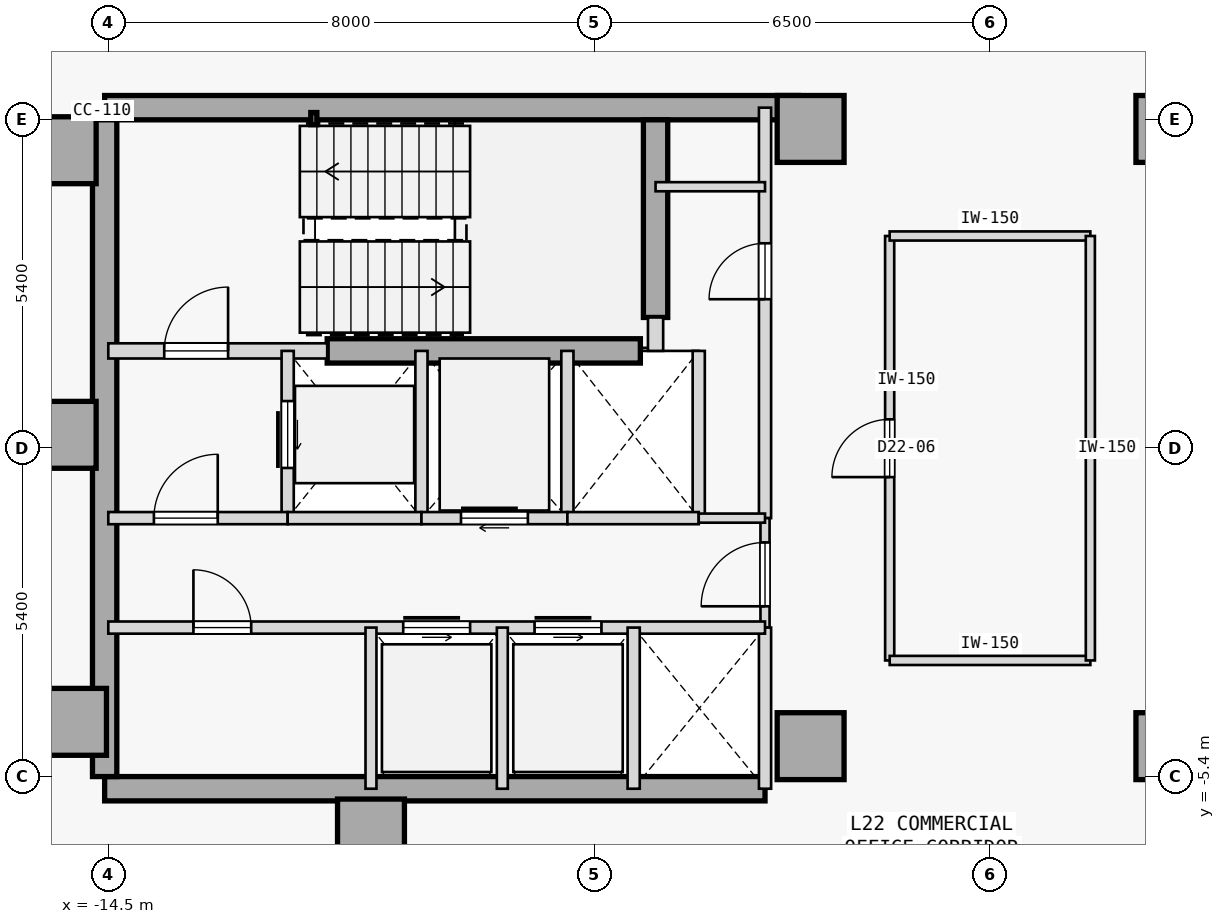
"""IFC4 building model, lengths in metres.
Left out: names, types, materials, properties, quantities, classifications, styles, units other than length and angle.
Written with IfcOpenShell. Run it as: python <this file> out.ifc"""

import sys

from ifc_helpers import new_model, si_unit, direction, frame, frame_2d, origin, origin_2d, place, context, subcontext, project, spatial, rectangle, hollow_rectangle, extrude, element, fill, save


model = new_model("IFC4")
c1 = context("Model", 3, precision=1e-05, world=origin(), true_north=direction((0.0, 1.0)))
c2 = subcontext(c1, "Body", "Model", "MODEL_VIEW")
j1 = project(units=[si_unit("LENGTHUNIT", "METRE"), si_unit("PLANEANGLEUNIT", "RADIAN")], contexts=[c1])
p1 = place(None, origin())
s1 = spatial("IfcSite", under=j1, at=p1, CompositionType="ELEMENT")
p2 = place(p1, origin())
s2 = spatial("IfcBuilding", under=s1, at=p2, CompositionType="ELEMENT")
p3 = place(p2, frame((0.0, 0.0, 91.1)))
s3 = spatial("IfcBuildingStorey", under=s2, at=p3, CompositionType="ELEMENT", Elevation=91.1)
for number, where, z_axis, x_axis in (
    (1, (-15.25, 4.9, 0.0), (0.0, 0.0, 1.0), (1.0, 0.0, 0.0)),
    (2, (-15.25, 0.22, 0.0), (0.0, 0.0, 1.0), (1.0, 0.0, 0.0)),
    (3, (-15.08, -4.5, 0.0), (0.0, 0.0, 1.0), (1.0, 0.0, 0.0)),
    (4, (-10.18, -6.32, 0.0), (0.0, 0.0, 1.0), (1.0, 0.0, 0.0)),
    (5, (-2.95, -4.9, 0.0), (0.0, 0.0, 1.0), (1.0, 0.0, 0.0)),
    (6, (-2.95, 5.25, 0.0), (0.0, 0.0, 1.0), (1.0, 0.0, 0.0)),
    (7, (2.95, -4.9, 0.0), (0.0, 0.0, 1.0), (1.0, 0.0, 0.0)),
    (8, (2.95, 5.25, 0.0), (0.0, 0.0, 1.0), (1.0, 0.0, 0.0)),
):
    element("IfcColumn", number, at=place(p3, frame(where, z_axis=z_axis, x_axis=x_axis)), inside=s3, PredefinedType="COLUMN", context=c2, shape_type="SweptSolid", body=[
        extrude(rectangle(XDim=1.1, YDim=1.1, at=origin_2d()), origin(), (0.0, 0.0, 1.0), 3.7),
    ])
p4 = place(p3, frame((-14.56, 5.6, 0.0), z_axis=(0.0, 0.0, 1.0), x_axis=(1.0, 0.0, 0.0)))
e9 = element("IfcWall", 9, at=p4, inside=s3, PredefinedType="SHEAR", context=c2, shape_type="SweptSolid", body=[
    extrude(rectangle(XDim=11.41, YDim=0.4, at=frame_2d((5.705, 0.0))), origin(), (0.0, 0.0, 1.0), 3.475),
])
p5 = place(p3, frame((-14.56, -5.6, 0.0), z_axis=(0.0, 0.0, 1.0), x_axis=(1.0, 0.0, 0.0)))
e10 = element("IfcWall", 10, at=p5, inside=s3, PredefinedType="SHEAR", context=c2, shape_type="SweptSolid", body=[
    extrude(rectangle(XDim=10.86, YDim=0.4, at=frame_2d((5.43, 0.0))), origin(), (0.0, 0.0, 1.0), 3.475),
])
p6 = place(p3, frame((-14.56, -5.4, 0.0), z_axis=(0.0, 0.0, 1.0), x_axis=(0.0, 1.0, 0.0)))
e11 = element("IfcWall", 11, at=p6, inside=s3, PredefinedType="SHEAR", context=c2, shape_type="SweptSolid", body=[
    extrude(rectangle(XDim=10.8, YDim=0.4, at=frame_2d((5.4, 0.0))), origin(), (0.0, 0.0, 1.0), 3.475),
])
p7 = place(p3, frame((-5.5, 2.15, 0.0), z_axis=(0.0, 0.0, 1.0), x_axis=(0.0, 1.0, 0.0)))
e12 = element("IfcWall", 12, at=p7, inside=s3, PredefinedType="SHEAR", context=c2, shape_type="SweptSolid", body=[
    extrude(rectangle(XDim=3.25, YDim=0.4, at=frame_2d((1.625, 0.0))), origin(), (0.0, 0.0, 1.0), 3.475),
])
p8 = place(p3, frame((-10.9, 1.6, 0.0), z_axis=(0.0, 0.0, 1.0), x_axis=(1.0, 0.0, 0.0)))
e13 = element("IfcWall", 13, at=p8, inside=s3, PredefinedType="SHEAR", context=c2, shape_type="SweptSolid", body=[
    extrude(rectangle(XDim=5.15, YDim=0.4, at=frame_2d((2.575, 0.0))), origin(), (0.0, 0.0, 1.0), 3.475),
])
p9 = place(p3, frame((-11.12, 5.42, 0.0), z_axis=(0.0, 0.0, 1.0), x_axis=(1.0, 0.0, 0.0)))
e14 = element("IfcColumn", 14, at=p9, inside=s3, PredefinedType="COLUMN", context=c2, shape_type="SweptSolid", body=[
    extrude(hollow_rectangle(XDim=0.1, YDim=0.2, WallThickness=0.008, at=origin_2d()), origin(), (0.0, 0.0, 1.0), 3.7),
])
p10 = place(p3, frame((-14.5, 1.6, 0.0), z_axis=(0.0, 0.0, 1.0), x_axis=(1.0, 0.0, 0.0)))
e15 = element("IfcWall", 15, at=p10, inside=s3, PredefinedType="STANDARD", context=c2, shape_type="SweptSolid", body=[
    extrude(rectangle(XDim=3.6, YDim=0.25, at=frame_2d((1.8, 0.0))), origin(), (0.0, 0.0, 1.0), 3.475),
])
p11 = place(p10, frame((0.92, 0.0, 0.0)))
e16 = element("IfcOpeningElement", 16, at=p11, cuts=e15, PredefinedType="OPENING", context=c2, shape_type="SweptSolid", body=[
    extrude(rectangle(XDim=1.05, YDim=2.15, at=frame_2d((0.525, 1.075))), frame((0.0, 0.135, 0.0), z_axis=(0.0, -1.0, 0.0), x_axis=(1.0, 0.0, 0.0)), (0.0, 0.0, 1.0), 0.27),
])
p12 = place(p3, frame((-5.5, 1.6, 0.0), z_axis=(0.0, 0.0, 1.0), x_axis=(0.0, 1.0, 0.0)))
e17 = element("IfcWall", 17, at=p12, inside=s3, PredefinedType="STANDARD", context=c2, shape_type="SweptSolid", body=[
    extrude(rectangle(XDim=0.55, YDim=0.25, at=frame_2d((0.275, 0.0))), origin(), (0.0, 0.0, 1.0), 3.475),
])
p13 = place(p3, frame((-3.7, -1.15, 0.0), z_axis=(0.0, 0.0, 1.0), x_axis=(0.0, 1.0, 0.0)))
e18 = element("IfcWall", 18, at=p13, inside=s3, PredefinedType="STANDARD", context=c2, shape_type="SweptSolid", body=[
    extrude(rectangle(XDim=6.75, YDim=0.2, at=frame_2d((3.375, 0.0))), origin(), (0.0, 0.0, 1.0), 3.475),
])
p14 = place(p13, frame((3.6, 0.0, 0.0)))
e19 = element("IfcOpeningElement", 19, at=p14, cuts=e18, PredefinedType="OPENING", context=c2, shape_type="SweptSolid", body=[
    extrude(rectangle(XDim=0.92, YDim=2.15, at=frame_2d((0.46, 1.075))), frame((0.0, 0.11, 0.0), z_axis=(0.0, -1.0, 0.0), x_axis=(1.0, 0.0, 0.0)), (0.0, 0.0, 1.0), 0.22),
])
p15 = place(p3, frame((-3.7, -2.95, 0.0), z_axis=(0.0, 0.0, 1.0), x_axis=(0.0, 1.0, 0.0)))
e20 = element("IfcWall", 20, at=p15, inside=s3, PredefinedType="PARTITIONING", context=c2, shape_type="SweptSolid", body=[
    extrude(rectangle(XDim=1.8, YDim=0.15, at=frame_2d((0.9, 0.0))), origin(), (0.0, 0.0, 1.0), 3.475),
])
p16 = place(p15, frame((0.35, 0.0, 0.0)))
e21 = element("IfcOpeningElement", 21, at=p16, cuts=e20, PredefinedType="OPENING", context=c2, shape_type="SweptSolid", body=[
    extrude(rectangle(XDim=1.05, YDim=2.18, at=frame_2d((0.525, 1.09))), frame((0.0, 0.085, 0.0), z_axis=(0.0, -1.0, 0.0), x_axis=(1.0, 0.0, 0.0)), (0.0, 0.0, 1.0), 0.17),
])
p17 = place(p3, frame((-3.7, -5.6, 0.0), z_axis=(0.0, 0.0, 1.0), x_axis=(0.0, 1.0, 0.0)))
e22 = element("IfcWall", 22, at=p17, inside=s3, PredefinedType="STANDARD", context=c2, shape_type="SweptSolid", body=[
    extrude(rectangle(XDim=2.65, YDim=0.2, at=frame_2d((1.325, 0.0))), origin(), (0.0, 0.0, 1.0), 3.475),
])
p18 = place(p3, frame((-11.55, -1.15, 0.0), z_axis=(0.0, 0.0, 1.0), x_axis=(0.0, 1.0, 0.0)))
e23 = element("IfcWall", 23, at=p18, inside=s3, PredefinedType="STANDARD", context=c2, shape_type="SweptSolid", body=[
    extrude(rectangle(XDim=2.75, YDim=0.2, at=frame_2d((1.375, 0.0))), origin(), (0.0, 0.0, 1.0), 3.475),
])
p19 = place(p18, frame((0.825, 0.0, 0.0)))
e24 = element("IfcOpeningElement", 24, at=p19, cuts=e23, PredefinedType="OPENING", context=c2, shape_type="SweptSolid", body=[
    extrude(rectangle(XDim=1.1, YDim=2.15, at=frame_2d((0.55, 1.075))), frame((0.0, 0.11, 0.0), z_axis=(0.0, -1.0, 0.0), x_axis=(1.0, 0.0, 0.0)), (0.0, 0.0, 1.0), 0.22),
])
p20 = place(p3, frame((-9.35, -1.15, 0.0), z_axis=(0.0, 0.0, 1.0), x_axis=(0.0, 1.0, 0.0)))
e25 = element("IfcWall", 25, at=p20, inside=s3, PredefinedType="STANDARD", context=c2, shape_type="SweptSolid", body=[
    extrude(rectangle(XDim=2.75, YDim=0.2, at=frame_2d((1.375, 0.0))), origin(), (0.0, 0.0, 1.0), 3.475),
])
p21 = place(p3, frame((-14.5, -1.15, 0.0), z_axis=(0.0, 0.0, 1.0), x_axis=(1.0, 0.0, 0.0)))
e26 = element("IfcWall", 26, at=p21, inside=s3, PredefinedType="STANDARD", context=c2, shape_type="SweptSolid", body=[
    extrude(rectangle(XDim=2.95, YDim=0.2, at=frame_2d((1.475, 0.0))), origin(), (0.0, 0.0, 1.0), 3.475),
])
p22 = place(p21, frame((0.75, 0.0, 0.0)))
e27 = element("IfcOpeningElement", 27, at=p22, cuts=e26, PredefinedType="OPENING", context=c2, shape_type="SweptSolid", body=[
    extrude(rectangle(XDim=1.05, YDim=2.18, at=frame_2d((0.525, 1.09))), frame((0.0, 0.11, 0.0), z_axis=(0.0, -1.0, 0.0), x_axis=(1.0, 0.0, 0.0)), (0.0, 0.0, 1.0), 0.22),
])
p23 = place(p3, frame((-11.55, -1.15, 0.0), z_axis=(0.0, 0.0, 1.0), x_axis=(1.0, 0.0, 0.0)))
e28 = element("IfcWall", 28, at=p23, inside=s3, PredefinedType="STANDARD", context=c2, shape_type="SweptSolid", body=[
    extrude(rectangle(XDim=2.2, YDim=0.2, at=frame_2d((1.1, 0.0))), origin(), (0.0, 0.0, 1.0), 3.475),
])
p24 = place(p3, frame((-6.95, -1.15, 0.0), z_axis=(0.0, 0.0, 1.0), x_axis=(0.0, 1.0, 0.0)))
e29 = element("IfcWall", 29, at=p24, inside=s3, PredefinedType="STANDARD", context=c2, shape_type="SweptSolid", body=[
    extrude(rectangle(XDim=2.75, YDim=0.2, at=frame_2d((1.375, 0.0))), origin(), (0.0, 0.0, 1.0), 3.475),
])
p25 = place(p3, frame((-9.35, -1.15, 0.0), z_axis=(0.0, 0.0, 1.0), x_axis=(1.0, 0.0, 0.0)))
e30 = element("IfcWall", 30, at=p25, inside=s3, PredefinedType="STANDARD", context=c2, shape_type="SweptSolid", body=[
    extrude(rectangle(XDim=2.4, YDim=0.2, at=frame_2d((1.2, 0.0))), origin(), (0.0, 0.0, 1.0), 3.475),
])
p26 = place(p25, frame((0.65, 0.0, 0.0)))
e31 = element("IfcOpeningElement", 31, at=p26, cuts=e30, PredefinedType="OPENING", context=c2, shape_type="SweptSolid", body=[
    extrude(rectangle(XDim=1.1, YDim=2.15, at=frame_2d((0.55, 1.075))), frame((0.0, 0.11, 0.0), z_axis=(0.0, -1.0, 0.0), x_axis=(1.0, 0.0, 0.0)), (0.0, 0.0, 1.0), 0.22),
])
p27 = place(p3, frame((-4.79, -1.15, 0.0), z_axis=(0.0, 0.0, 1.0), x_axis=(0.0, 1.0, 0.0)))
e32 = element("IfcWall", 32, at=p27, inside=s3, PredefinedType="STANDARD", context=c2, shape_type="SweptSolid", body=[
    extrude(rectangle(XDim=2.75, YDim=0.2, at=frame_2d((1.375, 0.0))), origin(), (0.0, 0.0, 1.0), 3.475),
])
p28 = place(p3, frame((-6.95, -1.15, 0.0), z_axis=(0.0, 0.0, 1.0), x_axis=(1.0, 0.0, 0.0)))
e33 = element("IfcWall", 33, at=p28, inside=s3, PredefinedType="STANDARD", context=c2, shape_type="SweptSolid", body=[
    extrude(rectangle(XDim=2.16, YDim=0.2, at=frame_2d((1.08, 0.0))), origin(), (0.0, 0.0, 1.0), 3.475),
])
p29 = place(p3, frame((-4.79, -1.15, 0.0), z_axis=(0.0, 0.0, 1.0), x_axis=(1.0, 0.0, 0.0)))
e34 = element("IfcWall", 34, at=p29, inside=s3, PredefinedType="PARTITIONING", context=c2, shape_type="SweptSolid", body=[
    extrude(rectangle(XDim=1.09, YDim=0.15, at=frame_2d((0.545, 0.0))), origin(), (0.0, 0.0, 1.0), 3.475),
])
p30 = place(p3, frame((-14.5, -2.95, 0.0), z_axis=(0.0, 0.0, 1.0), x_axis=(1.0, 0.0, 0.0)))
e35 = element("IfcWall", 35, at=p30, inside=s3, PredefinedType="STANDARD", context=c2, shape_type="SweptSolid", body=[
    extrude(rectangle(XDim=10.8, YDim=0.2, at=frame_2d((5.4, 0.0))), origin(), (0.0, 0.0, 1.0), 3.475),
])
p31 = place(p30, frame((4.85, 0.0, 0.0)))
e36 = element("IfcOpeningElement", 36, at=p31, cuts=e35, PredefinedType="OPENING", context=c2, shape_type="SweptSolid", body=[
    extrude(rectangle(XDim=1.1, YDim=2.15, at=frame_2d((0.55, 1.075))), frame((0.0, 0.11, 0.0), z_axis=(0.0, -1.0, 0.0), x_axis=(1.0, 0.0, 0.0)), (0.0, 0.0, 1.0), 0.22),
])
p32 = place(p30, frame((7.01, 0.0, 0.0)))
e37 = element("IfcOpeningElement", 37, at=p32, cuts=e35, PredefinedType="OPENING", context=c2, shape_type="SweptSolid", body=[
    extrude(rectangle(XDim=1.1, YDim=2.15, at=frame_2d((0.55, 1.075))), frame((0.0, 0.11, 0.0), z_axis=(0.0, -1.0, 0.0), x_axis=(1.0, 0.0, 0.0)), (0.0, 0.0, 1.0), 0.22),
])
p33 = place(p30, frame((1.4, 0.0, 0.0)))
e38 = element("IfcOpeningElement", 38, at=p33, cuts=e35, PredefinedType="OPENING", context=c2, shape_type="SweptSolid", body=[
    extrude(rectangle(XDim=0.95, YDim=2.15, at=frame_2d((0.475, 1.075))), frame((0.0, 0.11, 0.0), z_axis=(0.0, -1.0, 0.0), x_axis=(1.0, 0.0, 0.0)), (0.0, 0.0, 1.0), 0.22),
])
p34 = place(p3, frame((-5.86, -5.6, 0.0), z_axis=(0.0, 0.0, 1.0), x_axis=(0.0, 1.0, 0.0)))
e39 = element("IfcWall", 39, at=p34, inside=s3, PredefinedType="STANDARD", context=c2, shape_type="SweptSolid", body=[
    extrude(rectangle(XDim=2.65, YDim=0.2, at=frame_2d((1.325, 0.0))), origin(), (0.0, 0.0, 1.0), 3.475),
])
for number, where, z_axis, x_axis in (
    (40, (-10.18, -5.6, 0.0), (0.0, 0.0, 1.0), (0.0, 1.0, 0.0)),
    (41, (-8.02, -5.6, 0.0), (0.0, 0.0, 1.0), (0.0, 1.0, 0.0)),
):
    element("IfcWall", number, at=place(p3, frame(where, z_axis=z_axis, x_axis=x_axis)), inside=s3, PredefinedType="STANDARD", context=c2, shape_type="SweptSolid", body=[
        extrude(rectangle(XDim=2.65, YDim=0.18, at=frame_2d((1.325, 0.0))), origin(), (0.0, 0.0, 1.0), 3.475),
    ])
p35 = place(p3, frame((-5.5, 4.3, 0.0), z_axis=(0.0, 0.0, 1.0), x_axis=(1.0, 0.0, 0.0)))
e42 = element("IfcWall", 42, at=p35, inside=s3, PredefinedType="PARTITIONING", context=c2, shape_type="SweptSolid", body=[
    extrude(rectangle(XDim=1.8, YDim=0.15, at=frame_2d((0.9, 0.0))), origin(), (0.0, 0.0, 1.0), 3.475),
])
p36 = place(p3, frame((-1.65, -3.49, 0.0), z_axis=(0.0, 0.0, 1.0), x_axis=(-0.000104928124, 0.999999994495, 0.0)))
e43 = element("IfcWall", 43, at=p36, inside=s3, PredefinedType="PARTITIONING", context=c2, shape_type="SweptSolid", body=[
    extrude(rectangle(XDim=6.98, YDim=0.15, at=frame_2d((3.49, 0.0))), origin(), (0.0, 0.0, 1.0), 3.475),
])
p37 = place(p36, frame((3.015, 0.0, 0.0)))
e44 = element("IfcOpeningElement", 44, at=p37, cuts=e43, PredefinedType="OPENING", context=c2, shape_type="SweptSolid", body=[
    extrude(rectangle(XDim=0.95, YDim=2.15, at=frame_2d((0.475, 1.075))), frame((0.0, 0.085, 0.0), z_axis=(0.0, -1.0, 0.0), x_axis=(1.0, 0.0, 0.0)), (0.0, 0.0, 1.0), 0.17),
])
p38 = place(p3, frame((-1.65, -3.49, 0.0), z_axis=(0.0, 0.0, 1.0), x_axis=(1.0, 0.0, 0.0)))
e45 = element("IfcWall", 45, at=p38, inside=s3, PredefinedType="PARTITIONING", context=c2, shape_type="SweptSolid", body=[
    extrude(rectangle(XDim=3.3, YDim=0.15, at=frame_2d((1.65, 0.0))), origin(), (0.0, 0.0, 1.0), 3.475),
])
p39 = place(p3, frame((-1.65, 3.49, 0.0), z_axis=(0.0, 0.0, 1.0), x_axis=(1.0, 0.0, 0.0)))
e46 = element("IfcWall", 46, at=p39, inside=s3, PredefinedType="PARTITIONING", context=c2, shape_type="SweptSolid", body=[
    extrude(rectangle(XDim=3.3, YDim=0.15, at=frame_2d((1.65, 0.0))), origin(), (0.0, 0.0, 1.0), 3.475),
])
p40 = place(p3, frame((1.65, -3.49, 0.0), z_axis=(0.0, 0.0, 1.0), x_axis=(-6.9952083e-05, 0.999999997553, 0.0)))
e47 = element("IfcWall", 47, at=p40, inside=s3, PredefinedType="PARTITIONING", context=c2, shape_type="SweptSolid", body=[
    extrude(rectangle(XDim=6.98, YDim=0.15, at=frame_2d((3.49, 0.0))), origin(), (0.0, 0.0, 1.0), 3.475),
])
p41 = place(p11, origin())
e48 = element("IfcDoor", 48, at=p41, inside=s3, OperationType="SINGLE_SWING_RIGHT", PredefinedType="DOOR", context=c2, shape_type="SweptSolid", body=[
    extrude(rectangle(XDim=1.05, YDim=2.15, at=frame_2d((0.525, 1.075))), frame((0.0, 0.025, 0.0), z_axis=(0.0, -1.0, 0.0), x_axis=(1.0, 0.0, 0.0)), (0.0, 0.0, 1.0), 0.05),
])
fill(e16, e48)
p42 = place(p22, origin())
e49 = element("IfcDoor", 49, at=p42, inside=s3, OperationType="SINGLE_SWING_RIGHT", PredefinedType="DOOR", context=c2, shape_type="SweptSolid", body=[
    extrude(rectangle(XDim=1.05, YDim=2.18, at=frame_2d((0.525, 1.09))), frame((0.0, 0.025, 0.0), z_axis=(0.0, -1.0, 0.0), x_axis=(1.0, 0.0, 0.0)), (0.0, 0.0, 1.0), 0.05),
])
fill(e27, e49)
p43 = place(p16, origin())
e50 = element("IfcDoor", 50, at=p43, inside=s3, OperationType="SINGLE_SWING_LEFT", PredefinedType="DOOR", context=c2, shape_type="SweptSolid", body=[
    extrude(rectangle(XDim=1.05, YDim=2.18, at=frame_2d((0.525, 1.09))), frame((0.0, 0.025, 0.0), z_axis=(0.0, -1.0, 0.0), x_axis=(1.0, 0.0, 0.0)), (0.0, 0.0, 1.0), 0.05),
])
fill(e21, e50)
p44 = place(p19, origin())
e51 = element("IfcDoor", 51, at=p44, inside=s3, OperationType="SLIDING_TO_RIGHT", PredefinedType="DOOR", context=c2, shape_type="SweptSolid", body=[
    extrude(rectangle(XDim=1.1, YDim=2.15, at=frame_2d((0.55, 1.075))), frame((0.0, 0.025, 0.0), z_axis=(0.0, -1.0, 0.0), x_axis=(1.0, 0.0, 0.0)), (0.0, 0.0, 1.0), 0.05),
])
fill(e24, e51)
p45 = place(p26, origin())
e52 = element("IfcDoor", 52, at=p45, inside=s3, OperationType="SLIDING_TO_RIGHT", PredefinedType="DOOR", context=c2, shape_type="SweptSolid", body=[
    extrude(rectangle(XDim=1.1, YDim=2.15, at=frame_2d((0.55, 1.075))), frame((0.0, 0.025, 0.0), z_axis=(0.0, -1.0, 0.0), x_axis=(1.0, 0.0, 0.0)), (0.0, 0.0, 1.0), 0.05),
])
fill(e31, e52)
p46 = place(p31, origin())
e53 = element("IfcDoor", 53, at=p46, inside=s3, OperationType="SLIDING_TO_LEFT", PredefinedType="DOOR", context=c2, shape_type="SweptSolid", body=[
    extrude(rectangle(XDim=1.1, YDim=2.15, at=frame_2d((0.55, 1.075))), frame((0.0, 0.025, 0.0), z_axis=(0.0, -1.0, 0.0), x_axis=(1.0, 0.0, 0.0)), (0.0, 0.0, 1.0), 0.05),
])
fill(e36, e53)
p47 = place(p32, origin())
e54 = element("IfcDoor", 54, at=p47, inside=s3, OperationType="SLIDING_TO_LEFT", PredefinedType="DOOR", context=c2, shape_type="SweptSolid", body=[
    extrude(rectangle(XDim=1.1, YDim=2.15, at=frame_2d((0.55, 1.075))), frame((0.0, 0.025, 0.0), z_axis=(0.0, -1.0, 0.0), x_axis=(1.0, 0.0, 0.0)), (0.0, 0.0, 1.0), 0.05),
])
fill(e37, e54)
p48 = place(p33, origin())
e55 = element("IfcDoor", 55, at=p48, inside=s3, OperationType="SINGLE_SWING_LEFT", PredefinedType="DOOR", context=c2, shape_type="SweptSolid", body=[
    extrude(rectangle(XDim=0.95, YDim=2.15, at=frame_2d((0.475, 1.075))), frame((0.0, 0.025, 0.0), z_axis=(0.0, -1.0, 0.0), x_axis=(1.0, 0.0, 0.0)), (0.0, 0.0, 1.0), 0.05),
])
fill(e38, e55)
p49 = place(p14, origin())
e56 = element("IfcDoor", 56, at=p49, inside=s3, OperationType="SINGLE_SWING_LEFT", PredefinedType="DOOR", context=c2, shape_type="SweptSolid", body=[
    extrude(rectangle(XDim=0.92, YDim=2.15, at=frame_2d((0.46, 1.075))), frame((0.0, 0.025, 0.0), z_axis=(0.0, -1.0, 0.0), x_axis=(1.0, 0.0, 0.0)), (0.0, 0.0, 1.0), 0.05),
])
fill(e19, e56)
p50 = place(p37, origin())
e57 = element("IfcDoor", 57, at=p50, inside=s3, OperationType="SINGLE_SWING_LEFT", PredefinedType="DOOR", context=c2, shape_type="SweptSolid", body=[
    extrude(rectangle(XDim=0.95, YDim=2.15, at=frame_2d((0.475, 1.075))), frame((0.0, 0.025, 0.0), z_axis=(0.0, -1.0, 0.0), x_axis=(1.0, 0.0, 0.0)), (0.0, 0.0, 1.0), 0.05),
])
fill(e44, e57)
save(model, sys.argv[1])
